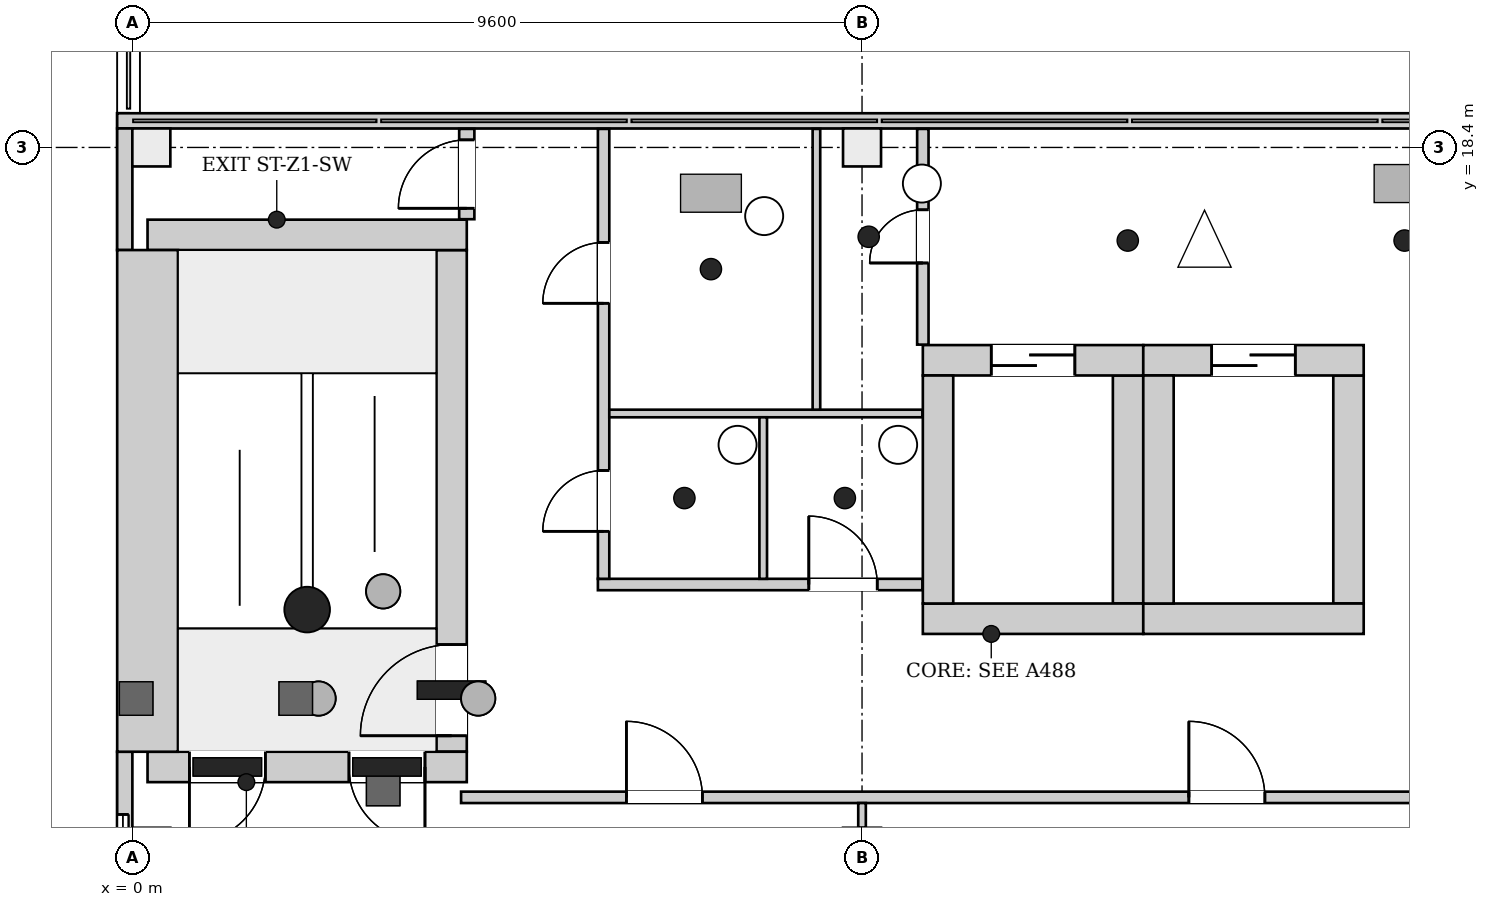
"""IFC4 building model, lengths in metres.
Left out: names, types, materials, properties, quantities, classifications, styles, units other than length and angle.
Written with IfcOpenShell. Run it as: python <this file> out.ifc"""

import sys

from ifc_helpers import new_model, si_unit, direction, frame, frame_2d, origin, origin_2d, place, context, subcontext, project, spatial, rectangle, extrude, element, fill, save


model = new_model("IFC4")
c1 = context("Model", 3, precision=1e-05, world=origin(), true_north=direction((0.0, 1.0)))
c2 = subcontext(c1, "Body", "Model", "MODEL_VIEW")
j1 = project(units=[si_unit("LENGTHUNIT", "METRE"), si_unit("PLANEANGLEUNIT", "RADIAN")], contexts=[c1])
p1 = place(None, origin())
s1 = spatial("IfcSite", under=j1, at=p1, CompositionType="ELEMENT")
p2 = place(p1, origin())
s2 = spatial("IfcBuilding", under=s1, at=p2, CompositionType="ELEMENT")
p3 = place(p2, frame((0.0, 0.0, 78.1)))
s3 = spatial("IfcBuildingStorey", under=s2, at=p3, CompositionType="ELEMENT", Elevation=78.1)
p4 = place(p3, frame((0.2, 10.25, 0.0), z_axis=(0.0, 0.0, 1.0), x_axis=(1.0, 0.0, 0.0)))
e1 = element("IfcWall", 1, at=p4, inside=s3, PredefinedType="SHEAR", context=c2, shape_type="SweptSolid", body=[
    extrude(rectangle(XDim=4.2, YDim=0.4, at=frame_2d((2.1, 0.0))), origin(), (0.0, 0.0, 1.0), 7.1),
])
p5 = place(p4, frame((0.55, 0.0, 4.2)))
e2 = element("IfcOpeningElement", 2, at=p5, cuts=e1, PredefinedType="OPENING", context=c2, shape_type="SweptSolid", body=[
    extrude(rectangle(XDim=1.0, YDim=2.1, at=frame_2d((0.5, 1.05))), frame((0.0, 0.21, 0.0), z_axis=(0.0, -1.0, 0.0), x_axis=(1.0, 0.0, 0.0)), (0.0, 0.0, 1.0), 0.42),
])
p6 = place(p4, frame((2.65, 0.0, 4.2)))
e3 = element("IfcOpeningElement", 3, at=p6, cuts=e1, PredefinedType="OPENING", context=c2, shape_type="SweptSolid", body=[
    extrude(rectangle(XDim=1.0, YDim=2.1, at=frame_2d((0.5, 1.05))), frame((0.0, 0.21, 0.0), z_axis=(0.0, -1.0, 0.0), x_axis=(1.0, 0.0, 0.0)), (0.0, 0.0, 1.0), 0.42),
])
p7 = place(p3, frame((0.2, 17.25, 0.0), z_axis=(0.0, 0.0, 1.0), x_axis=(1.0, 0.0, 0.0)))
e4 = element("IfcWall", 4, at=p7, inside=s3, PredefinedType="SHEAR", context=c2, shape_type="SweptSolid", body=[
    extrude(rectangle(XDim=4.2, YDim=0.4, at=frame_2d((2.1, 0.0))), origin(), (0.0, 0.0, 1.0), 7.1),
])
p8 = place(p3, frame((0.2, 10.45, 0.0), z_axis=(0.0, 0.0, 1.0), x_axis=(0.0, 1.0, 0.0)))
e5 = element("IfcWall", 5, at=p8, inside=s3, PredefinedType="SHEAR", context=c2, shape_type="SweptSolid", body=[
    extrude(rectangle(XDim=6.6, YDim=0.8, at=frame_2d((3.3, 0.0))), origin(), (0.0, 0.0, 1.0), 7.1),
])
p9 = place(p3, frame((4.2, 10.45, 0.0), z_axis=(0.0, 0.0, 1.0), x_axis=(0.0, 1.0, 0.0)))
e6 = element("IfcWall", 6, at=p9, inside=s3, PredefinedType="SHEAR", context=c2, shape_type="SweptSolid", body=[
    extrude(rectangle(XDim=6.6, YDim=0.4, at=frame_2d((3.3, 0.0))), origin(), (0.0, 0.0, 1.0), 7.1),
])
p10 = place(p9, frame((0.21, 0.0, 0.0)))
e7 = element("IfcOpeningElement", 7, at=p10, cuts=e6, PredefinedType="OPENING", context=c2, shape_type="SweptSolid", body=[
    extrude(rectangle(XDim=1.2, YDim=2.1, at=frame_2d((0.6, 1.05))), frame((0.0, 0.21, 0.0), z_axis=(0.0, -1.0, 0.0), x_axis=(1.0, 0.0, 0.0)), (0.0, 0.0, 1.0), 0.42),
])
p11 = place(p3, frame((10.4, 12.2, 0.0), z_axis=(0.0, 0.0, 1.0), x_axis=(1.0, 0.0, 0.0)))
e8 = element("IfcWall", 8, at=p11, inside=s3, PredefinedType="SHEAR", context=c2, shape_type="SweptSolid", body=[
    extrude(rectangle(XDim=2.9, YDim=0.4, at=frame_2d((1.45, 0.0))), origin(), (0.0, 0.0, 1.0), 7.6),
])
p12 = place(p3, frame((10.4, 15.6, 0.0), z_axis=(0.0, 0.0, 1.0), x_axis=(1.0, 0.0, 0.0)))
e9 = element("IfcWall", 9, at=p12, inside=s3, PredefinedType="SHEAR", context=c2, shape_type="SweptSolid", body=[
    extrude(rectangle(XDim=2.9, YDim=0.4, at=frame_2d((1.45, 0.0))), origin(), (0.0, 0.0, 1.0), 7.6),
])
p13 = place(p12, frame((0.9, 0.0, 0.0)))
e10 = element("IfcOpeningElement", 10, at=p13, cuts=e9, PredefinedType="OPENING", context=c2, shape_type="SweptSolid", body=[
    extrude(rectangle(XDim=1.1, YDim=2.1, at=frame_2d((0.55, 1.05))), frame((0.0, 0.21, 0.0), z_axis=(0.0, -1.0, 0.0), x_axis=(1.0, 0.0, 0.0)), (0.0, 0.0, 1.0), 0.42),
])
for number, where, z_axis, x_axis in (
    (11, (10.6, 12.4, 0.0), (0.0, 0.0, 1.0), (0.0, 1.0, 0.0)),
    (12, (13.1, 12.4, 0.0), (0.0, 0.0, 1.0), (0.0, 1.0, 0.0)),
):
    element("IfcWall", number, at=place(p3, frame(where, z_axis=z_axis, x_axis=x_axis)), inside=s3, PredefinedType="SHEAR", context=c2, shape_type="SweptSolid", body=[
        extrude(rectangle(XDim=3.0, YDim=0.4, at=frame_2d((1.5, 0.0))), origin(), (0.0, 0.0, 1.0), 7.6),
    ])
p14 = place(p3, frame((13.3, 12.2, 0.0), z_axis=(0.0, 0.0, 1.0), x_axis=(1.0, 0.0, 0.0)))
e13 = element("IfcWall", 13, at=p14, inside=s3, PredefinedType="SHEAR", context=c2, shape_type="SweptSolid", body=[
    extrude(rectangle(XDim=2.9, YDim=0.4, at=frame_2d((1.45, 0.0))), origin(), (0.0, 0.0, 1.0), 7.6),
])
p15 = place(p3, frame((13.3, 15.6, 0.0), z_axis=(0.0, 0.0, 1.0), x_axis=(1.0, 0.0, 0.0)))
e14 = element("IfcWall", 14, at=p15, inside=s3, PredefinedType="SHEAR", context=c2, shape_type="SweptSolid", body=[
    extrude(rectangle(XDim=2.9, YDim=0.4, at=frame_2d((1.45, 0.0))), origin(), (0.0, 0.0, 1.0), 7.6),
])
p16 = place(p15, frame((0.9, 0.0, 0.0)))
e15 = element("IfcOpeningElement", 15, at=p16, cuts=e14, PredefinedType="OPENING", context=c2, shape_type="SweptSolid", body=[
    extrude(rectangle(XDim=1.1, YDim=2.1, at=frame_2d((0.55, 1.05))), frame((0.0, 0.21, 0.0), z_axis=(0.0, -1.0, 0.0), x_axis=(1.0, 0.0, 0.0)), (0.0, 0.0, 1.0), 0.42),
])
for number, where, z_axis, x_axis in (
    (16, (13.5, 12.4, 0.0), (0.0, 0.0, 1.0), (0.0, 1.0, 0.0)),
    (17, (16.0, 12.4, 0.0), (0.0, 0.0, 1.0), (0.0, 1.0, 0.0)),
):
    element("IfcWall", number, at=place(p3, frame(where, z_axis=z_axis, x_axis=x_axis)), inside=s3, PredefinedType="SHEAR", context=c2, shape_type="SweptSolid", body=[
        extrude(rectangle(XDim=3.0, YDim=0.4, at=frame_2d((1.5, 0.0))), origin(), (0.0, 0.0, 1.0), 7.6),
    ])
for number, where, z_axis, x_axis in (
    (18, (0.25, 18.4, 0.0), (0.0, 0.0, 1.0), (1.0, 0.0, 0.0)),
    (19, (9.6, 18.4, 0.0), (0.0, 0.0, 1.0), (1.0, 0.0, 0.0)),
):
    element("IfcColumn", number, at=place(p3, frame(where, z_axis=z_axis, x_axis=x_axis)), inside=s3, PredefinedType="COLUMN", context=c2, shape_type="SweptSolid", body=[
        extrude(rectangle(XDim=0.5, YDim=0.5, at=origin_2d()), origin(), (0.0, 0.0, 1.0), 3.9),
    ])
p17 = place(p3, frame((-0.125, 10.45, 0.0), z_axis=(0.0, 0.0, 1.0), x_axis=(0.0, -1.0, 0.0)))
e20 = element("IfcWall", 20, at=p17, inside=s3, PredefinedType="ELEMENTEDWALL", context=c2, shape_type="SweptSolid", body=[
    extrude(rectangle(XDim=10.65, YDim=0.15, at=frame_2d((5.325, 0.0))), origin(), (0.0, 0.0, 1.0), 3.9),
])
p18 = place(p17, frame((8.025, 0.0, 0.9)))
e21 = element("IfcOpeningElement", 21, at=p18, cuts=e20, PredefinedType="OPENING", context=c2, shape_type="SweptSolid", body=[
    extrude(rectangle(XDim=1.8, YDim=2.6, at=frame_2d((0.9, 1.3))), frame((0.0, 0.085, 0.0), z_axis=(0.0, -1.0, 0.0), x_axis=(1.0, 0.0, 0.0)), (0.0, 0.0, 1.0), 0.17),
])
p19 = place(p17, frame((5.625, 0.0, 0.9)))
e22 = element("IfcOpeningElement", 22, at=p19, cuts=e20, PredefinedType="OPENING", context=c2, shape_type="SweptSolid", body=[
    extrude(rectangle(XDim=1.8, YDim=2.6, at=frame_2d((0.9, 1.3))), frame((0.0, 0.085, 0.0), z_axis=(0.0, -1.0, 0.0), x_axis=(1.0, 0.0, 0.0)), (0.0, 0.0, 1.0), 0.17),
])
p20 = place(p17, frame((3.225, 0.0, 0.9)))
e23 = element("IfcOpeningElement", 23, at=p20, cuts=e20, PredefinedType="OPENING", context=c2, shape_type="SweptSolid", body=[
    extrude(rectangle(XDim=1.8, YDim=2.6, at=frame_2d((0.9, 1.3))), frame((0.0, 0.085, 0.0), z_axis=(0.0, -1.0, 0.0), x_axis=(1.0, 0.0, 0.0)), (0.0, 0.0, 1.0), 0.17),
])
p21 = place(p17, frame((0.825, 0.0, 0.9)))
e24 = element("IfcOpeningElement", 24, at=p21, cuts=e20, PredefinedType="OPENING", context=c2, shape_type="SweptSolid", body=[
    extrude(rectangle(XDim=1.8, YDim=2.6, at=frame_2d((0.9, 1.3))), frame((0.0, 0.085, 0.0), z_axis=(0.0, -1.0, 0.0), x_axis=(1.0, 0.0, 0.0)), (0.0, 0.0, 1.0), 0.17),
])
p22 = place(p3, frame((-0.125, 18.85, 0.0), z_axis=(0.0, 0.0, 1.0), x_axis=(0.0, -1.0, 0.0)))
e25 = element("IfcWall", 25, at=p22, inside=s3, PredefinedType="ELEMENTEDWALL", context=c2, shape_type="SweptSolid", body=[
    extrude(rectangle(XDim=1.8, YDim=0.15, at=frame_2d((0.9, 0.0))), origin(), (0.0, 0.0, 1.0), 3.9),
])
p23 = place(p3, frame((23.0, 18.75, 4.2), z_axis=(0.0, 0.0, 1.0), x_axis=(-1.0, 0.0, 0.0)))
e26 = element("IfcWall", 26, at=p23, inside=s3, PredefinedType="PARAPET", context=c2, shape_type="SweptSolid", body=[
    extrude(rectangle(XDim=23.2, YDim=0.2, at=frame_2d((11.6, 0.0))), origin(), (0.0, 0.0, 1.0), 1.1),
])
p24 = place(p3, frame((-0.099, 10.45, 4.2), z_axis=(0.0, 0.0, 1.0), x_axis=(0.0, -1.0, 0.0)))
e27 = element("IfcWall", 27, at=p24, inside=s3, PredefinedType="PARAPET", context=c2, shape_type="SweptSolid", body=[
    extrude(rectangle(XDim=10.45, YDim=0.2, at=frame_2d((5.225, 0.0))), origin(), (0.0, 0.0, 1.0), 1.1),
])
p25 = place(p3, frame((-0.099, 18.65, 4.2), z_axis=(0.0, 0.0, 1.0), x_axis=(0.0, -1.0, 0.0)))
e28 = element("IfcWall", 28, at=p25, inside=s3, PredefinedType="PARAPET", context=c2, shape_type="SweptSolid", body=[
    extrude(rectangle(XDim=1.6, YDim=0.2, at=frame_2d((0.8, 0.0))), origin(), (0.0, 0.0, 1.0), 1.1),
])
p26 = place(p3, frame((4.4, 17.456, 0.0), z_axis=(0.0, 0.0, 1.0), x_axis=(0.0, 1.0, 0.0)))
e29 = element("IfcWall", 29, at=p26, inside=s3, PredefinedType="PARTITIONING", context=c2, shape_type="SweptSolid", body=[
    extrude(rectangle(XDim=1.188, YDim=0.2, at=frame_2d((0.594, 0.0))), origin(), (0.0, 0.0, 1.0), 3.9),
])
p27 = place(p26, frame((0.144, 0.0, 0.0)))
e30 = element("IfcOpeningElement", 30, at=p27, cuts=e29, PredefinedType="OPENING", context=c2, shape_type="SweptSolid", body=[
    extrude(rectangle(XDim=0.9, YDim=2.1, at=frame_2d((0.45, 1.05))), frame((0.0, 0.11, 0.0), z_axis=(0.0, -1.0, 0.0), x_axis=(1.0, 0.0, 0.0)), (0.0, 0.0, 1.0), 0.22),
])
p28 = place(p3, frame((4.325, 9.85, 0.0), z_axis=(0.0, 0.0, 1.0), x_axis=(1.0, 0.0, 0.0)))
e31 = element("IfcWall", 31, at=p28, inside=s3, PredefinedType="PARTITIONING", context=c2, shape_type="SweptSolid", body=[
    extrude(rectangle(XDim=24.219, YDim=0.15, at=frame_2d((12.109, 0.0))), origin(), (0.0, 0.0, 1.0), 3.9),
])
p29 = place(p28, frame((2.175, 0.0, 0.0)))
e32 = element("IfcOpeningElement", 32, at=p29, cuts=e31, PredefinedType="OPENING", context=c2, shape_type="SweptSolid", body=[
    extrude(rectangle(XDim=1.0, YDim=2.1, at=frame_2d((0.5, 1.05))), frame((0.0, 0.085, 0.0), z_axis=(0.0, -1.0, 0.0), x_axis=(1.0, 0.0, 0.0)), (0.0, 0.0, 1.0), 0.17),
])
p30 = place(p28, frame((9.575, 0.0, 0.0)))
e33 = element("IfcOpeningElement", 33, at=p30, cuts=e31, PredefinedType="OPENING", context=c2, shape_type="SweptSolid", body=[
    extrude(rectangle(XDim=1.0, YDim=2.1, at=frame_2d((0.5, 1.05))), frame((0.0, 0.085, 0.0), z_axis=(0.0, -1.0, 0.0), x_axis=(1.0, 0.0, 0.0)), (0.0, 0.0, 1.0), 0.17),
])
p31 = place(p28, frame((19.075, 0.0, 0.0)))
e34 = element("IfcOpeningElement", 34, at=p31, cuts=e31, PredefinedType="OPENING", context=c2, shape_type="SweptSolid", body=[
    extrude(rectangle(XDim=1.0, YDim=2.1, at=frame_2d((0.5, 1.05))), frame((0.0, 0.085, 0.0), z_axis=(0.0, -1.0, 0.0), x_axis=(1.0, 0.0, 0.0)), (0.0, 0.0, 1.0), 0.17),
])
p32 = place(p3, frame((6.125, 12.65, 0.0), z_axis=(0.0, 0.0, 1.0), x_axis=(1.0, 0.0, 0.0)))
e35 = element("IfcWall", 35, at=p32, inside=s3, PredefinedType="PARTITIONING", context=c2, shape_type="SweptSolid", body=[
    extrude(rectangle(XDim=4.269, YDim=0.15, at=frame_2d((2.135, 0.0))), origin(), (0.0, 0.0, 1.0), 3.9),
])
p33 = place(p32, frame((2.775, 0.0, 0.0)))
e36 = element("IfcOpeningElement", 36, at=p33, cuts=e35, PredefinedType="OPENING", context=c2, shape_type="SweptSolid", body=[
    extrude(rectangle(XDim=0.9, YDim=2.1, at=frame_2d((0.45, 1.05))), frame((0.0, 0.085, 0.0), z_axis=(0.0, -1.0, 0.0), x_axis=(1.0, 0.0, 0.0)), (0.0, 0.0, 1.0), 0.17),
])
p34 = place(p3, frame((6.2, 12.725, 0.0), z_axis=(0.0, 0.0, 1.0), x_axis=(0.0, 1.0, 0.0)))
e37 = element("IfcWall", 37, at=p34, inside=s3, PredefinedType="PARTITIONING", context=c2, shape_type="SweptSolid", body=[
    extrude(rectangle(XDim=5.919, YDim=0.15, at=frame_2d((2.959, 0.0))), origin(), (0.0, 0.0, 1.0), 3.9),
])
p35 = place(p34, frame((0.625, 0.0, 0.0)))
e38 = element("IfcOpeningElement", 38, at=p35, cuts=e37, PredefinedType="OPENING", context=c2, shape_type="SweptSolid", body=[
    extrude(rectangle(XDim=0.8, YDim=2.1, at=frame_2d((0.4, 1.05))), frame((0.0, 0.085, 0.0), z_axis=(0.0, -1.0, 0.0), x_axis=(1.0, 0.0, 0.0)), (0.0, 0.0, 1.0), 0.17),
])
p36 = place(p34, frame((3.625, 0.0, 0.0)))
e39 = element("IfcOpeningElement", 39, at=p36, cuts=e37, PredefinedType="OPENING", context=c2, shape_type="SweptSolid", body=[
    extrude(rectangle(XDim=0.8, YDim=2.1, at=frame_2d((0.4, 1.05))), frame((0.0, 0.085, 0.0), z_axis=(0.0, -1.0, 0.0), x_axis=(1.0, 0.0, 0.0)), (0.0, 0.0, 1.0), 0.17),
])
p37 = place(p3, frame((6.275, 14.9, 0.0), z_axis=(0.0, 0.0, 1.0), x_axis=(1.0, 0.0, 0.0)))
e40 = element("IfcWall", 40, at=p37, inside=s3, PredefinedType="PARTITIONING", context=c2, shape_type="SweptSolid", body=[
    extrude(rectangle(XDim=4.119, YDim=0.1, at=frame_2d((2.06, 0.0))), origin(), (0.0, 0.0, 1.0), 3.9),
])
p38 = place(p3, frame((8.3, 12.725, 0.0), z_axis=(0.0, 0.0, 1.0), x_axis=(0.0, 1.0, 0.0)))
e41 = element("IfcWall", 41, at=p38, inside=s3, PredefinedType="PARTITIONING", context=c2, shape_type="SweptSolid", body=[
    extrude(rectangle(XDim=2.125, YDim=0.1, at=frame_2d((1.062, 0.0))), origin(), (0.0, 0.0, 1.0), 3.9),
])
p39 = place(p3, frame((9.0, 14.95, 0.0), z_axis=(0.0, 0.0, 1.0), x_axis=(0.0, 1.0, 0.0)))
e42 = element("IfcWall", 42, at=p39, inside=s3, PredefinedType="PARTITIONING", context=c2, shape_type="SweptSolid", body=[
    extrude(rectangle(XDim=3.694, YDim=0.1, at=frame_2d((1.847, 0.0))), origin(), (0.0, 0.0, 1.0), 3.9),
])
p40 = place(p3, frame((9.6, 9.45, 0.0), z_axis=(0.0, 0.0, 1.0), x_axis=(0.0, 1.0, 0.0)))
e43 = element("IfcWall", 43, at=p40, inside=s3, PredefinedType="PARTITIONING", context=c2, shape_type="SweptSolid", body=[
    extrude(rectangle(XDim=0.325, YDim=0.1, at=frame_2d((0.163, 0.0))), origin(), (0.0, 0.0, 1.0), 3.9),
])
p41 = place(p3, frame((10.4, 15.806, 0.0), z_axis=(0.0, 0.0, 1.0), x_axis=(0.0, 1.0, 0.0)))
e44 = element("IfcWall", 44, at=p41, inside=s3, PredefinedType="PARTITIONING", context=c2, shape_type="SweptSolid", body=[
    extrude(rectangle(XDim=2.838, YDim=0.15, at=frame_2d((1.419, 0.0))), origin(), (0.0, 0.0, 1.0), 3.9),
])
p42 = place(p41, frame((1.074, 0.0, 0.0)))
e45 = element("IfcOpeningElement", 45, at=p42, cuts=e44, PredefinedType="OPENING", context=c2, shape_type="SweptSolid", body=[
    extrude(rectangle(XDim=0.7, YDim=2.1, at=frame_2d((0.35, 1.05))), frame((0.0, 0.085, 0.0), z_axis=(0.0, -1.0, 0.0), x_axis=(1.0, 0.0, 0.0)), (0.0, 0.0, 1.0), 0.17),
])
p43 = place(p21, origin())
e46 = element("IfcWindow", 46, at=p43, inside=s3, PartitioningType="SINGLE_PANEL", PredefinedType="WINDOW", context=c2, shape_type="SweptSolid", body=[
    extrude(rectangle(XDim=1.8, YDim=2.6, at=frame_2d((0.9, 1.3))), frame((0.0, 0.03, 0.0), z_axis=(0.0, -1.0, 0.0), x_axis=(1.0, 0.0, 0.0)), (0.0, 0.0, 1.0), 0.06),
])
fill(e24, e46)
p44 = place(p10, origin())
e47 = element("IfcDoor", 47, at=p44, inside=s3, OperationType="SINGLE_SWING_RIGHT", PredefinedType="DOOR", context=c2, shape_type="SweptSolid", body=[
    extrude(rectangle(XDim=1.2, YDim=2.1, at=frame_2d((0.6, 1.05))), frame((0.0, 0.025, 0.0), z_axis=(0.0, -1.0, 0.0), x_axis=(1.0, 0.0, 0.0)), (0.0, 0.0, 1.0), 0.05),
])
fill(e7, e47)
p45 = place(p5, frame((1.0, 0.0, 0.0), z_axis=(0.0, 0.0, 1.0), x_axis=(-1.0, 0.0, 0.0)))
e48 = element("IfcDoor", 48, at=p45, inside=s3, OperationType="SINGLE_SWING_LEFT", PredefinedType="DOOR", context=c2, shape_type="SweptSolid", body=[
    extrude(rectangle(XDim=1.0, YDim=2.1, at=frame_2d((0.5, 1.05))), frame((0.0, 0.025, 0.0), z_axis=(0.0, -1.0, 0.0), x_axis=(1.0, 0.0, 0.0)), (0.0, 0.0, 1.0), 0.05),
])
fill(e2, e48)
p46 = place(p6, frame((1.0, 0.0, 0.0), z_axis=(0.0, 0.0, 1.0), x_axis=(-1.0, 0.0, 0.0)))
e49 = element("IfcDoor", 49, at=p46, inside=s3, OperationType="SINGLE_SWING_RIGHT", PredefinedType="DOOR", context=c2, shape_type="SweptSolid", body=[
    extrude(rectangle(XDim=1.0, YDim=2.1, at=frame_2d((0.5, 1.05))), frame((0.0, 0.025, 0.0), z_axis=(0.0, -1.0, 0.0), x_axis=(1.0, 0.0, 0.0)), (0.0, 0.0, 1.0), 0.05),
])
fill(e3, e49)
p47 = place(p13, origin())
e50 = element("IfcDoor", 50, at=p47, inside=s3, OperationType="DOUBLE_DOOR_SLIDING", PredefinedType="DOOR", context=c2, shape_type="SweptSolid", body=[
    extrude(rectangle(XDim=1.1, YDim=2.1, at=frame_2d((0.55, 1.05))), frame((0.0, 0.025, 0.0), z_axis=(0.0, -1.0, 0.0), x_axis=(1.0, 0.0, 0.0)), (0.0, 0.0, 1.0), 0.05),
])
fill(e10, e50)
p48 = place(p16, origin())
e51 = element("IfcDoor", 51, at=p48, inside=s3, OperationType="DOUBLE_DOOR_SLIDING", PredefinedType="DOOR", context=c2, shape_type="SweptSolid", body=[
    extrude(rectangle(XDim=1.1, YDim=2.1, at=frame_2d((0.55, 1.05))), frame((0.0, 0.025, 0.0), z_axis=(0.0, -1.0, 0.0), x_axis=(1.0, 0.0, 0.0)), (0.0, 0.0, 1.0), 0.05),
])
fill(e15, e51)
p49 = place(p27, origin())
e52 = element("IfcDoor", 52, at=p49, inside=s3, OperationType="SINGLE_SWING_LEFT", PredefinedType="DOOR", context=c2, shape_type="SweptSolid", body=[
    extrude(rectangle(XDim=0.9, YDim=2.1, at=frame_2d((0.45, 1.05))), frame((0.0, 0.025, 0.0), z_axis=(0.0, -1.0, 0.0), x_axis=(1.0, 0.0, 0.0)), (0.0, 0.0, 1.0), 0.05),
])
fill(e30, e52)
p50 = place(p35, origin())
e53 = element("IfcDoor", 53, at=p50, inside=s3, OperationType="SINGLE_SWING_LEFT", PredefinedType="DOOR", context=c2, shape_type="SweptSolid", body=[
    extrude(rectangle(XDim=0.8, YDim=2.1, at=frame_2d((0.4, 1.05))), frame((0.0, 0.025, 0.0), z_axis=(0.0, -1.0, 0.0), x_axis=(1.0, 0.0, 0.0)), (0.0, 0.0, 1.0), 0.05),
])
fill(e38, e53)
p51 = place(p33, origin())
e54 = element("IfcDoor", 54, at=p51, inside=s3, OperationType="SINGLE_SWING_RIGHT", PredefinedType="DOOR", context=c2, shape_type="SweptSolid", body=[
    extrude(rectangle(XDim=0.9, YDim=2.1, at=frame_2d((0.45, 1.05))), frame((0.0, 0.025, 0.0), z_axis=(0.0, -1.0, 0.0), x_axis=(1.0, 0.0, 0.0)), (0.0, 0.0, 1.0), 0.05),
])
fill(e36, e54)
p52 = place(p36, origin())
e55 = element("IfcDoor", 55, at=p52, inside=s3, OperationType="SINGLE_SWING_LEFT", PredefinedType="DOOR", context=c2, shape_type="SweptSolid", body=[
    extrude(rectangle(XDim=0.8, YDim=2.1, at=frame_2d((0.4, 1.05))), frame((0.0, 0.025, 0.0), z_axis=(0.0, -1.0, 0.0), x_axis=(1.0, 0.0, 0.0)), (0.0, 0.0, 1.0), 0.05),
])
fill(e39, e55)
p53 = place(p42, origin())
e56 = element("IfcDoor", 56, at=p53, inside=s3, OperationType="SINGLE_SWING_LEFT", PredefinedType="DOOR", context=c2, shape_type="SweptSolid", body=[
    extrude(rectangle(XDim=0.7, YDim=2.1, at=frame_2d((0.35, 1.05))), frame((0.0, 0.025, 0.0), z_axis=(0.0, -1.0, 0.0), x_axis=(1.0, 0.0, 0.0)), (0.0, 0.0, 1.0), 0.05),
])
fill(e45, e56)
p54 = place(p29, origin())
e57 = element("IfcDoor", 57, at=p54, inside=s3, OperationType="SINGLE_SWING_RIGHT", PredefinedType="DOOR", context=c2, shape_type="SweptSolid", body=[
    extrude(rectangle(XDim=1.0, YDim=2.1, at=frame_2d((0.5, 1.05))), frame((0.0, 0.025, 0.0), z_axis=(0.0, -1.0, 0.0), x_axis=(1.0, 0.0, 0.0)), (0.0, 0.0, 1.0), 0.05),
])
fill(e32, e57)
p55 = place(p30, origin())
e58 = element("IfcDoor", 58, at=p55, inside=s3, OperationType="SINGLE_SWING_RIGHT", PredefinedType="DOOR", context=c2, shape_type="SweptSolid", body=[
    extrude(rectangle(XDim=1.0, YDim=2.1, at=frame_2d((0.5, 1.05))), frame((0.0, 0.025, 0.0), z_axis=(0.0, -1.0, 0.0), x_axis=(1.0, 0.0, 0.0)), (0.0, 0.0, 1.0), 0.05),
])
fill(e33, e58)
save(model, sys.argv[1])
